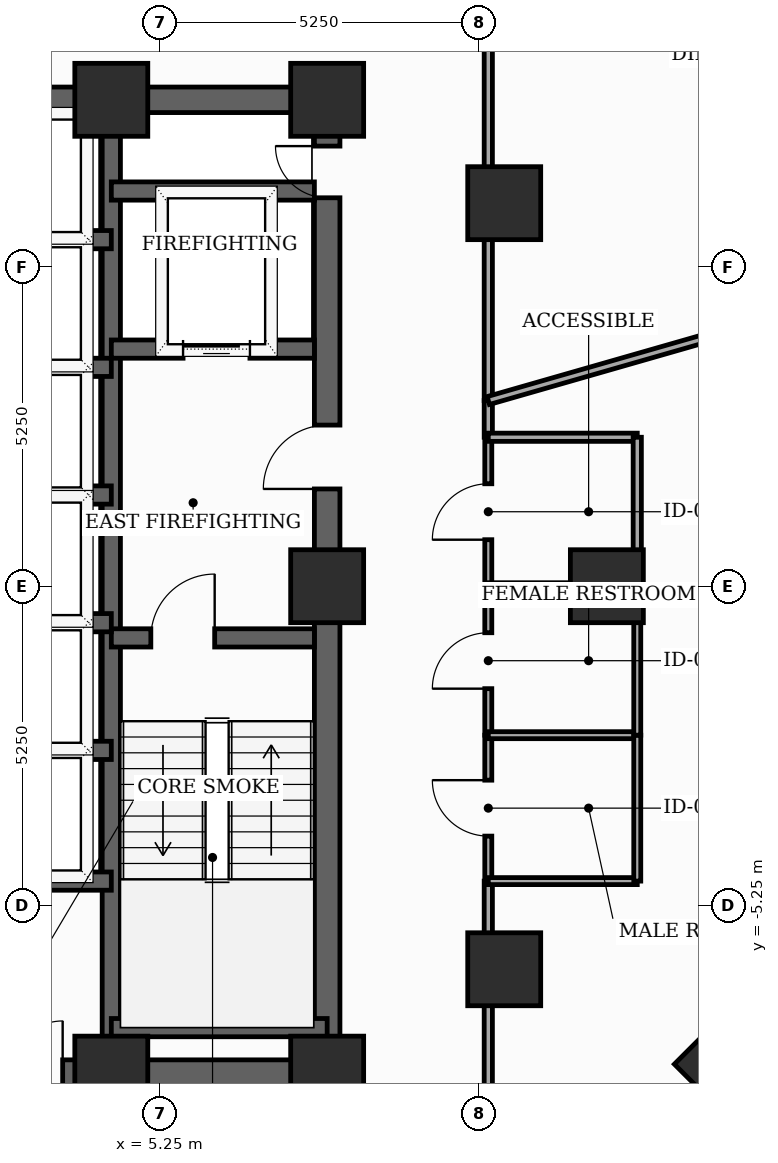
"""IFC4 building model, lengths in metres.
Left out: names, types, materials, properties, quantities, classifications, styles, units other than length and angle.
Written with IfcOpenShell. Run it as: python <this file> out.ifc"""

import sys

from ifc_helpers import new_model, si_unit, direction, frame, frame_2d, origin, origin_2d, place, context, subcontext, project, spatial, rectangle, extrude, element, fill, save


model = new_model("IFC4")
c1 = context("Model", 3, precision=1e-05, world=origin(), true_north=direction((0.0, 1.0)))
c2 = subcontext(c1, "Body", "Model", "MODEL_VIEW")
j1 = project(units=[si_unit("LENGTHUNIT", "METRE"), si_unit("PLANEANGLEUNIT", "RADIAN")], contexts=[c1])
p1 = place(None, origin())
s1 = spatial("IfcSite", under=j1, at=p1, CompositionType="ELEMENT")
p2 = place(p1, origin())
s2 = spatial("IfcBuilding", under=s1, at=p2, CompositionType="ELEMENT")
p3 = place(p2, frame((0.0, 0.0, 210.1)))
s3 = spatial("IfcBuildingStorey", under=s2, at=p3, CompositionType="ELEMENT", Elevation=210.1)
for number, where, z_axis, x_axis in (
    (1, (4.45, -8.0, 0.0), (0.0, 0.0, 1.0), (1.0, 0.0, 0.0)),
    (2, (8.0, -8.0, 0.0), (0.0, 0.0, 1.0), (1.0, 0.0, 0.0)),
    (3, (8.0, 0.0, 0.0), (0.0, 0.0, 1.0), (1.0, 0.0, 0.0)),
    (4, (8.0, 8.0, 0.0), (0.0, 0.0, 1.0), (1.0, 0.0, 0.0)),
    (5, (4.45, 8.0, 0.0), (0.0, 0.0, 1.0), (1.0, 0.0, 0.0)),
    (6, (12.6, 0.0, 0.0), (0.0, 0.0, 1.0), (1.0, 0.0, 0.0)),
    (7, (10.912, 6.3, 0.0), (0.0, 0.0, 1.0), (1.0, 0.0, 0.0)),
    (8, (10.912, -6.3, 0.0), (0.0, 0.0, 1.0), (1.0, 0.0, 0.0)),
):
    element("IfcColumn", number, at=place(p3, frame(where, z_axis=z_axis, x_axis=x_axis)), inside=s3, PredefinedType="COLUMN", context=c2, shape_type="SweptSolid", body=[
        extrude(rectangle(XDim=1.2, YDim=1.2, at=origin_2d()), origin(), (0.0, 0.0, 1.0), 3.7),
    ])
p4 = place(p3, frame((14.417, -7.861, 0.0), z_axis=(0.0, 0.0, 1.0), x_axis=(0.707106781187, 0.707106781187, 0.0)))
e9 = element("IfcColumn", 9, at=p4, inside=s3, PredefinedType="COLUMN", context=c2, shape_type="SweptSolid", body=[
    extrude(rectangle(XDim=1.0, YDim=1.0, at=origin_2d()), origin(), (0.0, 0.0, 1.0), 3.7),
])
p5 = place(p3, frame((8.0, -8.0, 0.0), z_axis=(0.0, 0.0, 1.0), x_axis=(0.0, 1.0, 0.0)))
e10 = element("IfcWall", 10, at=p5, inside=s3, PredefinedType="SHEAR", context=c2, shape_type="SweptSolid", body=[
    extrude(rectangle(XDim=16.0, YDim=0.42, at=frame_2d((8.0, 0.0))), origin(), (0.0, 0.0, 1.0), 3.46),
])
p6 = place(p5, frame((9.6, 0.0, 0.0)))
e11 = element("IfcOpeningElement", 11, at=p6, cuts=e10, PredefinedType="OPENING", context=c2, shape_type="SweptSolid", body=[
    extrude(rectangle(XDim=1.05, YDim=2.15, at=frame_2d((0.525, 1.075))), frame((0.0, 0.22, 0.0), z_axis=(0.0, -1.0, 0.0), x_axis=(1.0, 0.0, 0.0)), (0.0, 0.0, 1.0), 0.44),
])
p7 = place(p5, frame((14.389, 0.0, 0.0)))
e12 = element("IfcOpeningElement", 12, at=p7, cuts=e10, PredefinedType="OPENING", context=c2, shape_type="SweptSolid", body=[
    extrude(rectangle(XDim=0.85, YDim=2.02, at=frame_2d((0.425, 1.01))), frame((0.0, 0.22, 0.0), z_axis=(0.0, -1.0, 0.0), x_axis=(1.0, 0.0, 0.0)), (0.0, 0.0, 1.0), 0.44),
])
p8 = place(p3, frame((-8.0, -8.0, 0.0), z_axis=(0.0, 0.0, 1.0), x_axis=(1.0, 0.0, 0.0)))
e13 = element("IfcWall", 13, at=p8, inside=s3, PredefinedType="SHEAR", context=c2, shape_type="SweptSolid", body=[
    extrude(rectangle(XDim=16.0, YDim=0.42, at=frame_2d((8.0, 0.0))), origin(), (0.0, 0.0, 1.0), 3.46),
])
p9 = place(p8, frame((4.35, 0.0, 0.0)))
e14 = element("IfcOpeningElement", 14, at=p9, cuts=e13, PredefinedType="OPENING", context=c2, shape_type="SweptSolid", body=[
    extrude(rectangle(XDim=0.85, YDim=2.02, at=frame_2d((0.425, 1.01))), frame((0.0, 0.22, 0.0), z_axis=(0.0, -1.0, 0.0), x_axis=(1.0, 0.0, 0.0)), (0.0, 0.0, 1.0), 0.44),
])
p10 = place(p8, frame((6.49, 0.0, 0.0)))
e15 = element("IfcOpeningElement", 15, at=p10, cuts=e13, PredefinedType="OPENING", context=c2, shape_type="SweptSolid", body=[
    extrude(rectangle(XDim=0.85, YDim=2.02, at=frame_2d((0.425, 1.01))), frame((0.0, 0.22, 0.0), z_axis=(0.0, -1.0, 0.0), x_axis=(1.0, 0.0, 0.0)), (0.0, 0.0, 1.0), 0.44),
])
p11 = place(p8, frame((8.69, 0.0, 0.0)))
e16 = element("IfcOpeningElement", 16, at=p11, cuts=e13, PredefinedType="OPENING", context=c2, shape_type="SweptSolid", body=[
    extrude(rectangle(XDim=0.85, YDim=2.02, at=frame_2d((0.425, 1.01))), frame((0.0, 0.22, 0.0), z_axis=(0.0, -1.0, 0.0), x_axis=(1.0, 0.0, 0.0)), (0.0, 0.0, 1.0), 0.44),
])
p12 = place(p8, frame((10.8, 0.0, 0.0)))
e17 = element("IfcOpeningElement", 17, at=p12, cuts=e13, PredefinedType="OPENING", context=c2, shape_type="SweptSolid", body=[
    extrude(rectangle(XDim=0.85, YDim=2.02, at=frame_2d((0.425, 1.01))), frame((0.0, 0.22, 0.0), z_axis=(0.0, -1.0, 0.0), x_axis=(1.0, 0.0, 0.0)), (0.0, 0.0, 1.0), 0.44),
])
p13 = place(p3, frame((-8.0, 8.0, 0.0), z_axis=(0.0, 0.0, 1.0), x_axis=(1.0, 0.0, 0.0)))
e18 = element("IfcWall", 18, at=p13, inside=s3, PredefinedType="SHEAR", context=c2, shape_type="SweptSolid", body=[
    extrude(rectangle(XDim=16.0, YDim=0.42, at=frame_2d((8.0, 0.0))), origin(), (0.0, 0.0, 1.0), 3.46),
])
p14 = place(p13, frame((7.1, 0.0, 0.0)))
e19 = element("IfcOpeningElement", 19, at=p14, cuts=e18, PredefinedType="OPENING", context=c2, shape_type="SweptSolid", body=[
    extrude(rectangle(XDim=1.8, YDim=2.15, at=frame_2d((0.9, 1.075))), frame((0.0, 0.22, 0.0), z_axis=(0.0, -1.0, 0.0), x_axis=(1.0, 0.0, 0.0)), (0.0, 0.0, 1.0), 0.44),
])
p15 = place(p3, frame((4.45, -7.79, 0.0), z_axis=(0.0, 0.0, 1.0), x_axis=(0.0, 1.0, 0.0)))
e20 = element("IfcWall", 20, at=p15, inside=s3, PredefinedType="SHEAR", context=c2, shape_type="SweptSolid", body=[
    extrude(rectangle(XDim=15.58, YDim=0.3, at=frame_2d((7.79, 0.0))), origin(), (0.0, 0.0, 1.0), 3.46),
])
p16 = place(p3, frame((4.45, -0.85, 0.0), z_axis=(0.0, 0.0, 1.0), x_axis=(1.0, 0.0, 0.0)))
e21 = element("IfcWall", 21, at=p16, inside=s3, PredefinedType="SHEAR", context=c2, shape_type="SweptSolid", body=[
    extrude(rectangle(XDim=3.34, YDim=0.3, at=frame_2d((1.67, 0.0))), origin(), (0.0, 0.0, 1.0), 3.46),
])
p17 = place(p16, frame((0.65, 0.0, 0.0)))
e22 = element("IfcOpeningElement", 22, at=p17, cuts=e21, PredefinedType="OPENING", context=c2, shape_type="SweptSolid", body=[
    extrude(rectangle(XDim=1.05, YDim=2.15, at=frame_2d((0.525, 1.075))), frame((0.0, 0.16, 0.0), z_axis=(0.0, -1.0, 0.0), x_axis=(1.0, 0.0, 0.0)), (0.0, 0.0, 1.0), 0.32),
])
p18 = place(p3, frame((4.45, -7.26, 0.0), z_axis=(0.0, 0.0, 1.0), x_axis=(1.0, 0.0, 0.0)))
e23 = element("IfcWall", 23, at=p18, inside=s3, PredefinedType="SHEAR", context=c2, shape_type="SweptSolid", body=[
    extrude(rectangle(XDim=3.55, YDim=0.3, at=frame_2d((1.775, 0.0))), origin(), (0.0, 0.0, 1.0), 3.46),
])
p19 = place(p3, frame((4.45, 3.9, 0.0), z_axis=(0.0, 0.0, 1.0), x_axis=(1.0, 0.0, 0.0)))
e24 = element("IfcWall", 24, at=p19, inside=s3, PredefinedType="SHEAR", context=c2, shape_type="SweptSolid", body=[
    extrude(rectangle(XDim=3.34, YDim=0.3, at=frame_2d((1.67, 0.0))), origin(), (0.0, 0.0, 1.0), 3.46),
])
p20 = place(p19, frame((1.18, 0.0, 0.0)))
e25 = element("IfcOpeningElement", 25, at=p20, cuts=e24, PredefinedType="OPENING", context=c2, shape_type="SweptSolid", body=[
    extrude(rectangle(XDim=1.1, YDim=2.1, at=frame_2d((0.55, 1.05))), frame((0.0, 0.16, 0.0), z_axis=(0.0, -1.0, 0.0), x_axis=(1.0, 0.0, 0.0)), (0.0, 0.0, 1.0), 0.32),
])
p21 = place(p3, frame((4.45, 6.5, 0.0), z_axis=(0.0, 0.0, 1.0), x_axis=(1.0, 0.0, 0.0)))
e26 = element("IfcWall", 26, at=p21, inside=s3, PredefinedType="SHEAR", context=c2, shape_type="SweptSolid", body=[
    extrude(rectangle(XDim=3.34, YDim=0.3, at=frame_2d((1.67, 0.0))), origin(), (0.0, 0.0, 1.0), 3.46),
])
p22 = place(p3, frame((-4.45, -4.85, 0.0), z_axis=(0.0, 0.0, 1.0), x_axis=(1.0, 0.0, 0.0)))
e27 = element("IfcWall", 27, at=p22, inside=s3, PredefinedType="SHEAR", context=c2, shape_type="SweptSolid", body=[
    extrude(rectangle(XDim=8.9, YDim=0.3, at=frame_2d((4.45, 0.0))), origin(), (0.0, 0.0, 1.0), 3.46),
])
for number, where, z_axis, x_axis in (
    (28, (1.68, 1.5, 0.0), (0.0, 0.0, 1.0), (1.0, 0.0, 0.0)),
    (29, (1.68, 3.6, 0.0), (0.0, 0.0, 1.0), (1.0, 0.0, 0.0)),
    (30, (1.68, 5.7, 0.0), (0.0, 0.0, 1.0), (1.0, 0.0, 0.0)),
    (31, (1.68, -2.7, 0.0), (0.0, 0.0, 1.0), (1.0, 0.0, 0.0)),
    (32, (1.68, -0.6, 0.0), (0.0, 0.0, 1.0), (1.0, 0.0, 0.0)),
):
    element("IfcWall", number, at=place(p3, frame(where, z_axis=z_axis, x_axis=x_axis)), inside=s3, PredefinedType="SHEAR", context=c2, shape_type="SweptSolid", body=[
        extrude(rectangle(XDim=2.77, YDim=0.3, at=frame_2d((1.385, 0.0))), origin(), (0.0, 0.0, 1.0), 3.46),
    ])
p23 = place(p3, frame((10.65, -4.85, 0.0), z_axis=(0.0, 0.0, 1.0), x_axis=(0.0, 1.0, 0.0)))
e33 = element("IfcWall", 33, at=p23, inside=s3, PredefinedType="PARTITIONING", context=c2, shape_type="SweptSolid", body=[
    extrude(rectangle(XDim=2.4, YDim=0.115, at=frame_2d((1.2, 0.0))), origin(), (0.0, 0.0, 1.0), 3.46),
])
p24 = place(p23, frame((0.74, 0.0, 0.0)))
e34 = element("IfcOpeningElement", 34, at=p24, cuts=e33, PredefinedType="OPENING", context=c2, shape_type="SweptSolid", body=[
    extrude(rectangle(XDim=0.92, YDim=2.1, at=frame_2d((0.46, 1.05))), frame((0.0, 0.067, 0.0), z_axis=(0.0, -1.0, 0.0), x_axis=(1.0, 0.0, 0.0)), (0.0, 0.0, 1.0), 0.135),
])
p25 = place(p3, frame((10.65, -2.45, 0.0), z_axis=(0.0, 0.0, 1.0), x_axis=(0.0, 1.0, 0.0)))
e35 = element("IfcWall", 35, at=p25, inside=s3, PredefinedType="PARTITIONING", context=c2, shape_type="SweptSolid", body=[
    extrude(rectangle(XDim=2.45, YDim=0.115, at=frame_2d((1.225, 0.0))), origin(), (0.0, 0.0, 1.0), 2.845),
])
p26 = place(p25, frame((0.765, 0.0, 0.0)))
e36 = element("IfcOpeningElement", 36, at=p26, cuts=e35, PredefinedType="OPENING", context=c2, shape_type="SweptSolid", body=[
    extrude(rectangle(XDim=0.92, YDim=2.1, at=frame_2d((0.46, 1.05))), frame((0.0, 0.067, 0.0), z_axis=(0.0, -1.0, 0.0), x_axis=(1.0, 0.0, 0.0)), (0.0, 0.0, 1.0), 0.135),
])
p27 = place(p3, frame((10.65, -10.15, 0.0), z_axis=(0.0, 0.0, 1.0), x_axis=(0.0, 1.0, 0.0)))
e37 = element("IfcWall", 37, at=p27, inside=s3, PredefinedType="PARTITIONING", context=c2, shape_type="SweptSolid", body=[
    extrude(rectangle(XDim=5.3, YDim=0.135, at=frame_2d((2.65, 0.0))), origin(), (0.0, 0.0, 1.0), 2.845),
])
p28 = place(p27, frame((0.585, 0.0, 0.0)))
e38 = element("IfcOpeningElement", 38, at=p28, cuts=e37, PredefinedType="OPENING", context=c2, shape_type="SweptSolid", body=[
    extrude(rectangle(XDim=0.95, YDim=2.1, at=frame_2d((0.475, 1.05))), frame((0.0, 0.077, 0.0), z_axis=(0.0, -1.0, 0.0), x_axis=(1.0, 0.0, 0.0)), (0.0, 0.0, 1.0), 0.155),
])
p29 = place(p3, frame((10.65, 2.45, 0.0), z_axis=(0.0, 0.0, 1.0), x_axis=(0.0, 1.0, 0.0)))
e39 = element("IfcWall", 39, at=p29, inside=s3, PredefinedType="PARTITIONING", context=c2, shape_type="SweptSolid", body=[
    extrude(rectangle(XDim=0.604, YDim=0.135, at=frame_2d((0.302, 0.0))), origin(), (0.0, 0.0, 1.0), 3.46),
])
p30 = place(p3, frame((10.65, 0.0, 0.0), z_axis=(0.0, 0.0, 1.0), x_axis=(0.0, 1.0, 0.0)))
e40 = element("IfcWall", 40, at=p30, inside=s3, PredefinedType="PARTITIONING", context=c2, shape_type="SweptSolid", body=[
    extrude(rectangle(XDim=2.45, YDim=0.115, at=frame_2d((1.225, 0.0))), origin(), (0.0, 0.0, 1.0), 2.845),
])
p31 = place(p30, frame((0.765, 0.0, 0.0)))
e41 = element("IfcOpeningElement", 41, at=p31, cuts=e40, PredefinedType="OPENING", context=c2, shape_type="SweptSolid", body=[
    extrude(rectangle(XDim=0.92, YDim=2.1, at=frame_2d((0.46, 1.05))), frame((0.0, 0.067, 0.0), z_axis=(0.0, -1.0, 0.0), x_axis=(1.0, 0.0, 0.0)), (0.0, 0.0, 1.0), 0.135),
])
p32 = place(p3, frame((10.65, 3.054, 0.0), z_axis=(0.0, 0.0, 1.0), x_axis=(0.0, 1.0, 0.0)))
e42 = element("IfcWall", 42, at=p32, inside=s3, PredefinedType="PARTITIONING", context=c2, shape_type="SweptSolid", body=[
    extrude(rectangle(XDim=7.096, YDim=0.135, at=frame_2d((3.548, 0.0))), origin(), (0.0, 0.0, 1.0), 2.045),
])
for number, where, z_axis, x_axis in (
    (43, (13.1, -2.45, 0.0), (0.0, 0.0, 1.0), (-1.0, 0.0, 0.0)),
    (44, (10.65, -4.85, 0.0), (0.0, 0.0, 1.0), (1.0, 0.0, 0.0)),
):
    element("IfcWall", number, at=place(p3, frame(where, z_axis=z_axis, x_axis=x_axis)), inside=s3, PredefinedType="PARTITIONING", context=c2, shape_type="SweptSolid", body=[
        extrude(rectangle(XDim=2.45, YDim=0.115, at=frame_2d((1.225, 0.0))), origin(), (0.0, 0.0, 1.0), 2.845),
    ])
p33 = place(p3, frame((13.1, -4.85, 0.0), z_axis=(0.0, 0.0, 1.0), x_axis=(0.0, 1.0, 0.0)))
e45 = element("IfcWall", 45, at=p33, inside=s3, PredefinedType="PARTITIONING", context=c2, shape_type="SweptSolid", body=[
    extrude(rectangle(XDim=2.4, YDim=0.115, at=frame_2d((1.2, 0.0))), origin(), (0.0, 0.0, 1.0), 3.46),
])
p34 = place(p3, frame((13.1, -2.45, 0.0), z_axis=(0.0, 0.0, 1.0), x_axis=(0.0, 1.0, 0.0)))
e46 = element("IfcWall", 46, at=p34, inside=s3, PredefinedType="PARTITIONING", context=c2, shape_type="SweptSolid", body=[
    extrude(rectangle(XDim=2.45, YDim=0.115, at=frame_2d((1.225, 0.0))), origin(), (0.0, 0.0, 1.0), 2.045),
])
p35 = place(p3, frame((13.1, 0.0, 0.0), z_axis=(0.0, 0.0, 1.0), x_axis=(-1.0, 0.0, 0.0)))
e47 = element("IfcWall", 47, at=p35, inside=s3, PredefinedType="PARTITIONING", context=c2, shape_type="SweptSolid", body=[
    extrude(rectangle(XDim=2.45, YDim=0.115, at=frame_2d((1.225, 0.0))), origin(), (0.0, 0.0, 1.0), 2.045),
])
p36 = place(p3, frame((10.65, 2.45, 0.0), z_axis=(0.0, 0.0, 1.0), x_axis=(1.0, 0.0, 0.0)))
e48 = element("IfcWall", 48, at=p36, inside=s3, PredefinedType="PARTITIONING", context=c2, shape_type="SweptSolid", body=[
    extrude(rectangle(XDim=2.45, YDim=0.135, at=frame_2d((1.225, 0.0))), origin(), (0.0, 0.0, 1.0), 2.845),
])
p37 = place(p3, frame((13.1, 2.45, 0.0), z_axis=(0.0, 0.0, 1.0), x_axis=(0.0, -1.0, 0.0)))
e49 = element("IfcWall", 49, at=p37, inside=s3, PredefinedType="PARTITIONING", context=c2, shape_type="SweptSolid", body=[
    extrude(rectangle(XDim=2.45, YDim=0.135, at=frame_2d((1.225, 0.0))), origin(), (0.0, 0.0, 1.0), 2.045),
])
p38 = place(p3, frame((28.998, 8.315, 0.0), z_axis=(0.0, 0.0, 1.0), x_axis=(-0.961257547597, -0.275651822392, 0.0)))
e50 = element("IfcWall", 50, at=p38, inside=s3, PredefinedType="PARTITIONING", context=c2, shape_type="SweptSolid", body=[
    extrude(rectangle(XDim=19.087, YDim=0.135, at=frame_2d((9.544, 0.0))), origin(), (0.0, 0.0, 1.0), 2.045),
])
p39 = place(p6, origin())
e51 = element("IfcDoor", 51, at=p39, inside=s3, OperationType="SINGLE_SWING_LEFT", PredefinedType="DOOR", context=c2, shape_type="SweptSolid", body=[
    extrude(rectangle(XDim=1.05, YDim=2.15, at=frame_2d((0.525, 1.075))), frame((0.0, 0.025, 0.0), z_axis=(0.0, -1.0, 0.0), x_axis=(1.0, 0.0, 0.0)), (0.0, 0.0, 1.0), 0.05),
])
fill(e11, e51)
p40 = place(p7, origin())
e52 = element("IfcDoor", 52, at=p40, inside=s3, OperationType="SINGLE_SWING_RIGHT", PredefinedType="TRAPDOOR", context=c2, shape_type="SweptSolid", body=[
    extrude(rectangle(XDim=0.85, YDim=2.02, at=frame_2d((0.425, 1.01))), frame((0.0, 0.025, 0.0), z_axis=(0.0, -1.0, 0.0), x_axis=(1.0, 0.0, 0.0)), (0.0, 0.0, 1.0), 0.05),
])
fill(e12, e52)
p41 = place(p12, origin())
e53 = element("IfcDoor", 53, at=p41, inside=s3, OperationType="SINGLE_SWING_RIGHT", PredefinedType="TRAPDOOR", context=c2, shape_type="SweptSolid", body=[
    extrude(rectangle(XDim=0.85, YDim=2.02, at=frame_2d((0.425, 1.01))), frame((0.0, 0.025, 0.0), z_axis=(0.0, -1.0, 0.0), x_axis=(1.0, 0.0, 0.0)), (0.0, 0.0, 1.0), 0.05),
])
fill(e17, e53)
p42 = place(p17, origin())
e54 = element("IfcDoor", 54, at=p42, inside=s3, OperationType="SINGLE_SWING_RIGHT", PredefinedType="DOOR", context=c2, shape_type="SweptSolid", body=[
    extrude(rectangle(XDim=1.05, YDim=2.15, at=frame_2d((0.525, 1.075))), frame((0.0, 0.025, 0.0), z_axis=(0.0, -1.0, 0.0), x_axis=(1.0, 0.0, 0.0)), (0.0, 0.0, 1.0), 0.05),
])
fill(e22, e54)
p43 = place(p20, origin())
e55 = element("IfcDoor", 55, at=p43, inside=s3, OperationType="SLIDING_TO_LEFT", PredefinedType="DOOR", context=c2, shape_type="SweptSolid", body=[
    extrude(rectangle(XDim=1.1, YDim=2.1, at=frame_2d((0.55, 1.05))), frame((0.0, 0.025, 0.0), z_axis=(0.0, -1.0, 0.0), x_axis=(1.0, 0.0, 0.0)), (0.0, 0.0, 1.0), 0.05),
])
fill(e25, e55)
p44 = place(p24, origin())
e56 = element("IfcDoor", 56, at=p44, inside=s3, OperationType="SINGLE_SWING_RIGHT", PredefinedType="DOOR", context=c2, shape_type="SweptSolid", body=[
    extrude(rectangle(XDim=0.92, YDim=2.1, at=frame_2d((0.46, 1.05))), frame((0.0, 0.025, 0.0), z_axis=(0.0, -1.0, 0.0), x_axis=(1.0, 0.0, 0.0)), (0.0, 0.0, 1.0), 0.05),
])
fill(e34, e56)
p45 = place(p26, origin())
e57 = element("IfcDoor", 57, at=p45, inside=s3, OperationType="SINGLE_SWING_LEFT", PredefinedType="DOOR", context=c2, shape_type="SweptSolid", body=[
    extrude(rectangle(XDim=0.92, YDim=2.1, at=frame_2d((0.46, 1.05))), frame((0.0, 0.025, 0.0), z_axis=(0.0, -1.0, 0.0), x_axis=(1.0, 0.0, 0.0)), (0.0, 0.0, 1.0), 0.05),
])
fill(e36, e57)
p46 = place(p31, origin())
e58 = element("IfcDoor", 58, at=p46, inside=s3, OperationType="SINGLE_SWING_LEFT", PredefinedType="DOOR", context=c2, shape_type="SweptSolid", body=[
    extrude(rectangle(XDim=0.92, YDim=2.1, at=frame_2d((0.46, 1.05))), frame((0.0, 0.025, 0.0), z_axis=(0.0, -1.0, 0.0), x_axis=(1.0, 0.0, 0.0)), (0.0, 0.0, 1.0), 0.05),
])
fill(e41, e58)
save(model, sys.argv[1])
